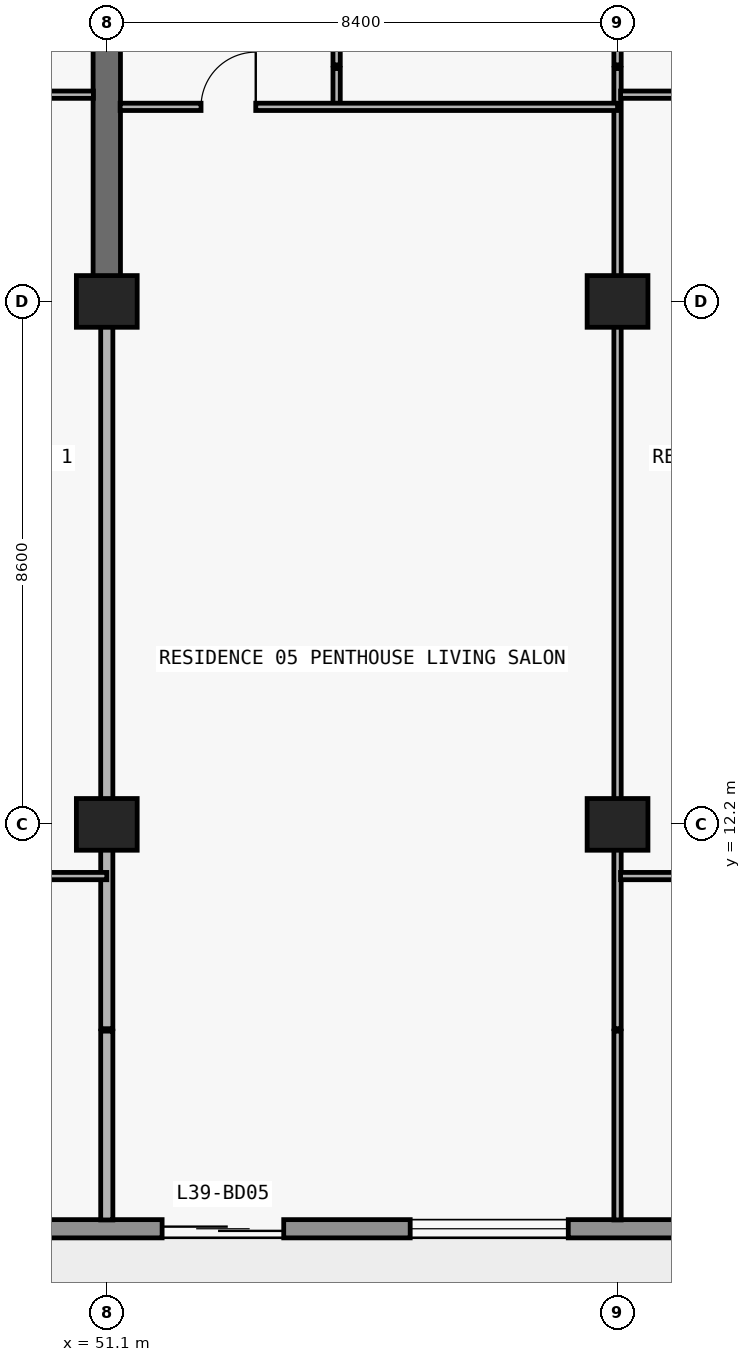
"""IFC4 building model, lengths in metres.
Left out: names, types, materials, properties, quantities, classifications, styles, units other than length and angle.
Written with IfcOpenShell. Run it as: python <this file> out.ifc"""

import sys

from ifc_helpers import new_model, si_unit, direction, frame, frame_2d, origin, origin_2d, place, context, subcontext, project, spatial, rectangle, extrude, element, fill, save


model = new_model("IFC4")
c1 = context("Model", 3, precision=1e-05, world=origin(), true_north=direction((0.0, 1.0)))
c2 = subcontext(c1, "Body", "Model", "MODEL_VIEW")
j1 = project(units=[si_unit("LENGTHUNIT", "METRE"), si_unit("PLANEANGLEUNIT", "RADIAN")], contexts=[c1])
p1 = place(None, origin())
s1 = spatial("IfcSite", under=j1, at=p1, CompositionType="ELEMENT")
p2 = place(p1, origin())
s2 = spatial("IfcBuilding", under=s1, at=p2, CompositionType="ELEMENT")
p3 = place(p2, frame((0.0, 0.0, 142.2)))
s3 = spatial("IfcBuildingStorey", under=s2, at=p3, CompositionType="ELEMENT", Elevation=142.2)
for number, where, z_axis, x_axis in (
    (1, (51.1, 12.2, 0.0), (0.0, 0.0, 1.0), (1.0, 0.0, 0.0)),
    (2, (59.5, 12.2, 0.0), (0.0, 0.0, 1.0), (1.0, 0.0, 0.0)),
    (3, (51.1, 20.8, 0.0), (0.0, 0.0, 1.0), (1.0, 0.0, 0.0)),
    (4, (59.5, 20.8, 0.0), (0.0, 0.0, 1.0), (1.0, 0.0, 0.0)),
):
    element("IfcColumn", number, at=place(p3, frame(where, z_axis=z_axis, x_axis=x_axis)), inside=s3, PredefinedType="COLUMN", context=c2, shape_type="SweptSolid", body=[
        extrude(rectangle(XDim=1.0, YDim=0.85, at=origin_2d()), origin(), (0.0, 0.0, 1.0), 3.05),
    ])
p4 = place(p3, frame((51.1, 20.8, 0.0), z_axis=(0.0, 0.0, 1.0), x_axis=(0.0, 1.0, 0.0)))
e5 = element("IfcWall", 5, at=p4, inside=s3, PredefinedType="SHEAR", context=c2, shape_type="SweptSolid", body=[
    extrude(rectangle(XDim=8.6, YDim=0.45, at=frame_2d((4.3, 0.0))), origin(), (0.0, 0.0, 1.0), 3.05),
])
p5 = place(p3, frame((70.1, 5.55, 0.0), z_axis=(0.0, 0.0, 1.0), x_axis=(-1.0, 0.0, 0.0)))
e6 = element("IfcWall", 6, at=p5, inside=s3, PredefinedType="STANDARD", context=c2, shape_type="SweptSolid", body=[
    extrude(rectangle(XDim=62.4, YDim=0.3, at=frame_2d((31.2, 0.0))), origin(), (0.0, 0.0, 1.0), 3.05),
])
p6 = place(p5, frame((57.226, 0.0, 0.0)))
e7 = element("IfcOpeningElement", 7, at=p6, cuts=e6, PredefinedType="OPENING", context=c2, shape_type="SweptSolid", body=[
    extrude(rectangle(XDim=2.0, YDim=2.3, at=frame_2d((1.0, 1.15))), frame((0.0, 0.16, 0.0), z_axis=(0.0, -1.0, 0.0), x_axis=(1.0, 0.0, 0.0)), (0.0, 0.0, 1.0), 0.32),
])
p7 = place(p5, frame((52.926, 0.0, 0.85)))
e8 = element("IfcOpeningElement", 8, at=p7, cuts=e6, PredefinedType="OPENING", context=c2, shape_type="SweptSolid", body=[
    extrude(rectangle(XDim=2.2, YDim=1.55, at=frame_2d((1.1, 0.775))), frame((0.0, 0.16, 0.0), z_axis=(0.0, -1.0, 0.0), x_axis=(1.0, 0.0, 0.0)), (0.0, 0.0, 1.0), 0.32),
])
p8 = place(p5, frame((48.49, 0.0, 0.0)))
e9 = element("IfcOpeningElement", 9, at=p8, cuts=e6, PredefinedType="OPENING", context=c2, shape_type="SweptSolid", body=[
    extrude(rectangle(XDim=2.0, YDim=2.3, at=frame_2d((1.0, 1.15))), frame((0.0, 0.16, 0.0), z_axis=(0.0, -1.0, 0.0), x_axis=(1.0, 0.0, 0.0)), (0.0, 0.0, 1.0), 0.32),
])
p9 = place(p5, frame((44.39, 0.0, 0.85)))
e10 = element("IfcOpeningElement", 10, at=p9, cuts=e6, PredefinedType="OPENING", context=c2, shape_type="SweptSolid", body=[
    extrude(rectangle(XDim=1.8, YDim=1.55, at=frame_2d((0.9, 0.775))), frame((0.0, 0.16, 0.0), z_axis=(0.0, -1.0, 0.0), x_axis=(1.0, 0.0, 0.0)), (0.0, 0.0, 1.0), 0.32),
])
p10 = place(p5, frame((40.426, 0.0, 0.0)))
e11 = element("IfcOpeningElement", 11, at=p10, cuts=e6, PredefinedType="OPENING", context=c2, shape_type="SweptSolid", body=[
    extrude(rectangle(XDim=2.0, YDim=2.3, at=frame_2d((1.0, 1.15))), frame((0.0, 0.16, 0.0), z_axis=(0.0, -1.0, 0.0), x_axis=(1.0, 0.0, 0.0)), (0.0, 0.0, 1.0), 0.32),
])
p11 = place(p5, frame((36.126, 0.0, 0.85)))
e12 = element("IfcOpeningElement", 12, at=p11, cuts=e6, PredefinedType="OPENING", context=c2, shape_type="SweptSolid", body=[
    extrude(rectangle(XDim=2.2, YDim=1.55, at=frame_2d((1.1, 0.775))), frame((0.0, 0.16, 0.0), z_axis=(0.0, -1.0, 0.0), x_axis=(1.0, 0.0, 0.0)), (0.0, 0.0, 1.0), 0.32),
])
p12 = place(p5, frame((32.09, 0.0, 0.0)))
e13 = element("IfcOpeningElement", 13, at=p12, cuts=e6, PredefinedType="OPENING", context=c2, shape_type="SweptSolid", body=[
    extrude(rectangle(XDim=2.0, YDim=2.3, at=frame_2d((1.0, 1.15))), frame((0.0, 0.16, 0.0), z_axis=(0.0, -1.0, 0.0), x_axis=(1.0, 0.0, 0.0)), (0.0, 0.0, 1.0), 0.32),
])
p13 = place(p5, frame((28.21, 0.0, 0.65)))
e14 = element("IfcOpeningElement", 14, at=p13, cuts=e6, PredefinedType="OPENING", context=c2, shape_type="SweptSolid", body=[
    extrude(rectangle(XDim=2.6, YDim=1.85, at=frame_2d((1.3, 0.925))), frame((0.0, 0.16, 0.0), z_axis=(0.0, -1.0, 0.0), x_axis=(1.0, 0.0, 0.0)), (0.0, 0.0, 1.0), 0.32),
])
p14 = place(p5, frame((22.1, 0.0, 0.85)))
e15 = element("IfcOpeningElement", 15, at=p14, cuts=e6, PredefinedType="OPENING", context=c2, shape_type="SweptSolid", body=[
    extrude(rectangle(XDim=2.2, YDim=1.55, at=frame_2d((1.1, 0.775))), frame((0.0, 0.16, 0.0), z_axis=(0.0, -1.0, 0.0), x_axis=(1.0, 0.0, 0.0)), (0.0, 0.0, 1.0), 0.32),
])
p15 = place(p5, frame((16.09, 0.0, 0.0)))
e16 = element("IfcOpeningElement", 16, at=p15, cuts=e6, PredefinedType="OPENING", context=c2, shape_type="SweptSolid", body=[
    extrude(rectangle(XDim=2.0, YDim=2.3, at=frame_2d((1.0, 1.15))), frame((0.0, 0.16, 0.0), z_axis=(0.0, -1.0, 0.0), x_axis=(1.0, 0.0, 0.0)), (0.0, 0.0, 1.0), 0.32),
])
p16 = place(p5, frame((11.41, 0.0, 0.65)))
e17 = element("IfcOpeningElement", 17, at=p16, cuts=e6, PredefinedType="OPENING", context=c2, shape_type="SweptSolid", body=[
    extrude(rectangle(XDim=2.6, YDim=1.85, at=frame_2d((1.3, 0.925))), frame((0.0, 0.16, 0.0), z_axis=(0.0, -1.0, 0.0), x_axis=(1.0, 0.0, 0.0)), (0.0, 0.0, 1.0), 0.32),
])
p17 = place(p5, frame((5.3, 0.0, 0.85)))
e18 = element("IfcOpeningElement", 18, at=p17, cuts=e6, PredefinedType="OPENING", context=c2, shape_type="SweptSolid", body=[
    extrude(rectangle(XDim=2.2, YDim=1.55, at=frame_2d((1.1, 0.775))), frame((0.0, 0.16, 0.0), z_axis=(0.0, -1.0, 0.0), x_axis=(1.0, 0.0, 0.0)), (0.0, 0.0, 1.0), 0.32),
])
p18 = place(p3, frame((51.1, 5.695, 0.0), z_axis=(0.0, 0.0, 1.0), x_axis=(0.0, 1.0, 0.0)))
e19 = element("IfcWall", 19, at=p18, inside=s3, PredefinedType="PARTITIONING", context=c2, shape_type="SweptSolid", body=[
    extrude(rectangle(XDim=3.105, YDim=0.2, at=frame_2d((1.552, 0.0))), origin(), (0.0, 0.0, 1.0), 3.05),
])
p19 = place(p3, frame((51.1, 8.84, 0.0), z_axis=(0.0, 0.0, 1.0), x_axis=(0.0, 1.0, 0.0)))
e20 = element("IfcWall", 20, at=p19, inside=s3, PredefinedType="PARTITIONING", context=c2, shape_type="SweptSolid", body=[
    extrude(rectangle(XDim=11.955, YDim=0.2, at=frame_2d((5.978, 0.0))), origin(), (0.0, 0.0, 1.0), 2.174),
])
p20 = place(p3, frame((54.88, 24.0, 0.0), z_axis=(0.0, 0.0, 1.0), x_axis=(0.0, 1.0, 0.0)))
e21 = element("IfcWall", 21, at=p20, inside=s3, PredefinedType="PARTITIONING", context=c2, shape_type="SweptSolid", body=[
    extrude(rectangle(XDim=0.63, YDim=0.12, at=frame_2d((0.315, 0.0))), origin(), (0.0, 0.0, 1.0), 3.05),
])
p21 = place(p3, frame((54.88, 24.69, 0.0), z_axis=(0.0, 0.0, 1.0), x_axis=(0.0, 1.0, 0.0)))
e22 = element("IfcWall", 22, at=p21, inside=s3, PredefinedType="PARTITIONING", context=c2, shape_type="SweptSolid", body=[
    extrude(rectangle(XDim=4.11, YDim=0.12, at=frame_2d((2.055, 0.0))), origin(), (0.0, 0.0, 1.0), 3.05),
])
p22 = place(p21, frame((1.605, 0.0, 0.0)))
e23 = element("IfcOpeningElement", 23, at=p22, cuts=e22, PredefinedType="OPENING", context=c2, shape_type="SweptSolid", body=[
    extrude(rectangle(XDim=0.9, YDim=2.15, at=frame_2d((0.45, 1.075))), frame((0.0, 0.07, 0.0), z_axis=(0.0, -1.0, 0.0), x_axis=(1.0, 0.0, 0.0)), (0.0, 0.0, 1.0), 0.14),
])
p23 = place(p3, frame((59.5, 5.695, 0.0), z_axis=(0.0, 0.0, 1.0), x_axis=(0.0, 1.0, 0.0)))
e24 = element("IfcWall", 24, at=p23, inside=s3, PredefinedType="PARTITIONING", context=c2, shape_type="SweptSolid", body=[
    extrude(rectangle(XDim=3.105, YDim=0.12, at=frame_2d((1.552, 0.0))), origin(), (0.0, 0.0, 1.0), 3.05),
])
p24 = place(p3, frame((59.5, 8.84, 0.0), z_axis=(0.0, 0.0, 1.0), x_axis=(0.0, 1.0, 0.0)))
e25 = element("IfcWall", 25, at=p24, inside=s3, PredefinedType="PARTITIONING", context=c2, shape_type="SweptSolid", body=[
    extrude(rectangle(XDim=15.79, YDim=0.12, at=frame_2d((7.895, 0.0))), origin(), (0.0, 0.0, 1.0), 2.174),
])
p25 = place(p3, frame((59.5, 24.69, 0.0), z_axis=(0.0, 0.0, 1.0), x_axis=(0.0, 1.0, 0.0)))
e26 = element("IfcWall", 26, at=p25, inside=s3, PredefinedType="PARTITIONING", context=c2, shape_type="SweptSolid", body=[
    extrude(rectangle(XDim=5.09, YDim=0.12, at=frame_2d((2.545, 0.0))), origin(), (0.0, 0.0, 1.0), 2.174),
])
p26 = place(p25, frame((1.505, 0.0, 0.0)))
e27 = element("IfcOpeningElement", 27, at=p26, cuts=e26, PredefinedType="OPENING", context=c2, shape_type="SweptSolid", body=[
    extrude(rectangle(XDim=0.9, YDim=2.124, at=frame_2d((0.45, 1.062))), frame((0.0, 0.07, 0.0), z_axis=(0.0, -1.0, 0.0), x_axis=(1.0, 0.0, 0.0)), (0.0, 0.0, 1.0), 0.14),
])
p27 = place(p3, frame((42.7, 11.35, 0.0), z_axis=(0.0, 0.0, 1.0), x_axis=(1.0, 0.0, 0.0)))
e28 = element("IfcWall", 28, at=p27, inside=s3, PredefinedType="PARTITIONING", context=c2, shape_type="SweptSolid", body=[
    extrude(rectangle(XDim=8.4, YDim=0.12, at=frame_2d((4.2, 0.0))), origin(), (0.0, 0.0, 1.0), 3.05),
])
p28 = place(p27, frame((3.75, 0.0, 0.0)))
e29 = element("IfcOpeningElement", 29, at=p28, cuts=e28, PredefinedType="OPENING", context=c2, shape_type="SweptSolid", body=[
    extrude(rectangle(XDim=0.9, YDim=2.15, at=frame_2d((0.45, 1.075))), frame((0.0, 0.07, 0.0), z_axis=(0.0, -1.0, 0.0), x_axis=(1.0, 0.0, 0.0)), (0.0, 0.0, 1.0), 0.14),
])
p29 = place(p3, frame((59.55, 11.35, 0.0), z_axis=(0.0, 0.0, 1.0), x_axis=(1.0, 0.0, 0.0)))
e30 = element("IfcWall", 30, at=p29, inside=s3, PredefinedType="PARTITIONING", context=c2, shape_type="SweptSolid", body=[
    extrude(rectangle(XDim=8.35, YDim=0.12, at=frame_2d((4.175, 0.0))), origin(), (0.0, 0.0, 1.0), 3.05),
])
p30 = place(p29, frame((3.725, 0.0, 0.0)))
e31 = element("IfcOpeningElement", 31, at=p30, cuts=e30, PredefinedType="OPENING", context=c2, shape_type="SweptSolid", body=[
    extrude(rectangle(XDim=0.9, YDim=2.15, at=frame_2d((0.45, 1.075))), frame((0.0, 0.07, 0.0), z_axis=(0.0, -1.0, 0.0), x_axis=(1.0, 0.0, 0.0)), (0.0, 0.0, 1.0), 0.14),
])
p31 = place(p3, frame((51.32, 24.0, 0.0), z_axis=(0.0, 0.0, 1.0), x_axis=(1.0, 0.0, 0.0)))
e32 = element("IfcWall", 32, at=p31, inside=s3, PredefinedType="PARTITIONING", context=c2, shape_type="SweptSolid", body=[
    extrude(rectangle(XDim=8.18, YDim=0.12, at=frame_2d((4.09, 0.0))), origin(), (0.0, 0.0, 1.0), 3.05),
])
p32 = place(p31, frame((1.33, 0.0, 0.0)))
e33 = element("IfcOpeningElement", 33, at=p32, cuts=e32, PredefinedType="OPENING", context=c2, shape_type="SweptSolid", body=[
    extrude(rectangle(XDim=0.9, YDim=2.15, at=frame_2d((0.45, 1.075))), frame((0.0, 0.07, 0.0), z_axis=(0.0, -1.0, 0.0), x_axis=(1.0, 0.0, 0.0)), (0.0, 0.0, 1.0), 0.14),
])
p33 = place(p3, frame((42.705, 24.2, 0.0), z_axis=(0.0, 0.0, 1.0), x_axis=(1.0, 0.0, 0.0)))
e34 = element("IfcWall", 34, at=p33, inside=s3, PredefinedType="PARTITIONING", context=c2, shape_type="SweptSolid", body=[
    extrude(rectangle(XDim=8.175, YDim=0.12, at=frame_2d((4.087, 0.0))), origin(), (0.0, 0.0, 1.0), 3.05),
])
p34 = place(p33, frame((3.637, 0.0, 0.0)))
e35 = element("IfcOpeningElement", 35, at=p34, cuts=e34, PredefinedType="OPENING", context=c2, shape_type="SweptSolid", body=[
    extrude(rectangle(XDim=0.9, YDim=2.15, at=frame_2d((0.45, 1.075))), frame((0.0, 0.07, 0.0), z_axis=(0.0, -1.0, 0.0), x_axis=(1.0, 0.0, 0.0)), (0.0, 0.0, 1.0), 0.14),
])
p35 = place(p3, frame((59.55, 24.2, 0.0), z_axis=(0.0, 0.0, 1.0), x_axis=(1.0, 0.0, 0.0)))
e36 = element("IfcWall", 36, at=p35, inside=s3, PredefinedType="PARTITIONING", context=c2, shape_type="SweptSolid", body=[
    extrude(rectangle(XDim=8.35, YDim=0.12, at=frame_2d((4.175, 0.0))), origin(), (0.0, 0.0, 1.0), 3.05),
])
p36 = place(p35, frame((3.725, 0.0, 0.0)))
e37 = element("IfcOpeningElement", 37, at=p36, cuts=e36, PredefinedType="OPENING", context=c2, shape_type="SweptSolid", body=[
    extrude(rectangle(XDim=0.9, YDim=2.15, at=frame_2d((0.45, 1.075))), frame((0.0, 0.07, 0.0), z_axis=(0.0, -1.0, 0.0), x_axis=(1.0, 0.0, 0.0)), (0.0, 0.0, 1.0), 0.14),
])
p37 = place(p15, origin())
e38 = element("IfcDoor", 38, at=p37, inside=s3, OperationType="DOUBLE_DOOR_SLIDING", PredefinedType="DOOR", context=c2, shape_type="SweptSolid", body=[
    extrude(rectangle(XDim=2.0, YDim=2.3, at=frame_2d((1.0, 1.15))), frame((0.0, 0.025, 0.0), z_axis=(0.0, -1.0, 0.0), x_axis=(1.0, 0.0, 0.0)), (0.0, 0.0, 1.0), 0.05),
])
fill(e16, e38)
p38 = place(p16, origin())
e39 = element("IfcWindow", 39, at=p38, inside=s3, PartitioningType="SINGLE_PANEL", PredefinedType="WINDOW", context=c2, shape_type="SweptSolid", body=[
    extrude(rectangle(XDim=2.6, YDim=1.85, at=frame_2d((1.3, 0.925))), frame((0.0, 0.03, 0.0), z_axis=(0.0, -1.0, 0.0), x_axis=(1.0, 0.0, 0.0)), (0.0, 0.0, 1.0), 0.06),
])
fill(e17, e39)
p39 = place(p32, origin())
e40 = element("IfcDoor", 40, at=p39, inside=s3, OperationType="SINGLE_SWING_RIGHT", PredefinedType="DOOR", context=c2, shape_type="SweptSolid", body=[
    extrude(rectangle(XDim=0.9, YDim=2.15, at=frame_2d((0.45, 1.075))), frame((0.0, 0.025, 0.0), z_axis=(0.0, -1.0, 0.0), x_axis=(1.0, 0.0, 0.0)), (0.0, 0.0, 1.0), 0.05),
])
fill(e33, e40)
save(model, sys.argv[1])
